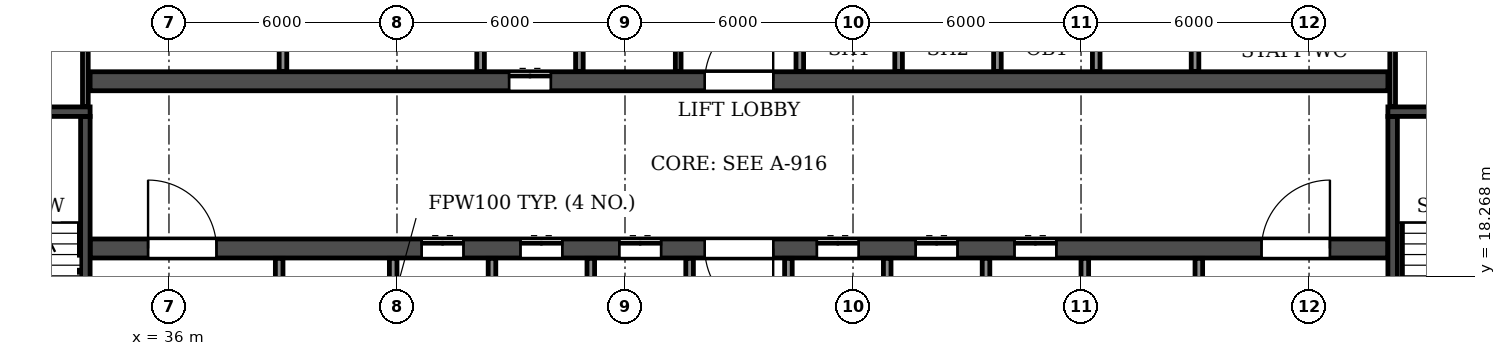
"""IFC4 building model, lengths in metres.
Left out: names, types, materials, properties, quantities, classifications, styles, units other than length and angle.
Written with IfcOpenShell. Run it as: python <this file> out.ifc"""

import sys

from ifc_helpers import new_model, si_unit, direction, frame, frame_2d, origin, place, context, subcontext, project, spatial, rectangle, extrude, element, fill, save


model = new_model("IFC4")
c1 = context("Model", 3, precision=1e-05, world=origin(), true_north=direction((0.0, 1.0)))
c2 = subcontext(c1, "Body", "Model", "MODEL_VIEW")
j1 = project(units=[si_unit("LENGTHUNIT", "METRE"), si_unit("PLANEANGLEUNIT", "RADIAN")], contexts=[c1])
p1 = place(None, origin())
s1 = spatial("IfcSite", under=j1, at=p1, CompositionType="ELEMENT")
p2 = place(p1, origin())
s2 = spatial("IfcBuilding", under=s1, at=p2, CompositionType="ELEMENT")
p3 = place(p2, frame((0.0, 0.0, 82.8)))
s3 = spatial("IfcBuildingStorey", under=s2, at=p3, CompositionType="ELEMENT", Elevation=82.8)
p4 = place(p3, frame((33.925, 19.0, 0.0), z_axis=(0.0, 0.0, 1.0), x_axis=(1.0, 0.0, 0.0)))
e1 = element("IfcWall", 1, at=p4, inside=s3, PredefinedType="SOLIDWALL", context=c2, shape_type="SweptSolid", body=[
    extrude(rectangle(XDim=34.15, YDim=0.5, at=frame_2d((17.075, 0.0))), origin(), (0.0, 0.0, 1.0), 3.06),
])
p5 = place(p4, frame((16.175, 0.0, 0.0)))
e2 = element("IfcOpeningElement", 2, at=p5, cuts=e1, PredefinedType="OPENING", context=c2, shape_type="SweptSolid", body=[
    extrude(rectangle(XDim=1.8, YDim=2.1, at=frame_2d((0.9, 1.05))), frame((0.0, 0.26, 0.0), z_axis=(0.0, -1.0, 0.0), x_axis=(1.0, 0.0, 0.0)), (0.0, 0.0, 1.0), 0.52),
])
p6 = place(p4, frame((1.525, 0.0, 0.0)))
e3 = element("IfcOpeningElement", 3, at=p6, cuts=e1, PredefinedType="OPENING", context=c2, shape_type="SweptSolid", body=[
    extrude(rectangle(XDim=1.8, YDim=2.1, at=frame_2d((0.9, 1.05))), frame((0.0, 0.26, 0.0), z_axis=(0.0, -1.0, 0.0), x_axis=(1.0, 0.0, 0.0)), (0.0, 0.0, 1.0), 0.52),
])
p7 = place(p4, frame((8.725, 0.0, 0.0)))
e4 = element("IfcOpeningElement", 4, at=p7, cuts=e1, PredefinedType="OPENING", context=c2, shape_type="SweptSolid", body=[
    extrude(rectangle(XDim=1.1, YDim=2.1, at=frame_2d((0.55, 1.05))), frame((0.0, 0.26, 0.0), z_axis=(0.0, -1.0, 0.0), x_axis=(1.0, 0.0, 0.0)), (0.0, 0.0, 1.0), 0.52),
])
p8 = place(p4, frame((11.325, 0.0, 0.0)))
e5 = element("IfcOpeningElement", 5, at=p8, cuts=e1, PredefinedType="OPENING", context=c2, shape_type="SweptSolid", body=[
    extrude(rectangle(XDim=1.1, YDim=2.1, at=frame_2d((0.55, 1.05))), frame((0.0, 0.26, 0.0), z_axis=(0.0, -1.0, 0.0), x_axis=(1.0, 0.0, 0.0)), (0.0, 0.0, 1.0), 0.52),
])
p9 = place(p4, frame((13.925, 0.0, 0.0)))
e6 = element("IfcOpeningElement", 6, at=p9, cuts=e1, PredefinedType="OPENING", context=c2, shape_type="SweptSolid", body=[
    extrude(rectangle(XDim=1.1, YDim=2.1, at=frame_2d((0.55, 1.05))), frame((0.0, 0.26, 0.0), z_axis=(0.0, -1.0, 0.0), x_axis=(1.0, 0.0, 0.0)), (0.0, 0.0, 1.0), 0.52),
])
p10 = place(p4, frame((19.125, 0.0, 0.0)))
e7 = element("IfcOpeningElement", 7, at=p10, cuts=e1, PredefinedType="OPENING", context=c2, shape_type="SweptSolid", body=[
    extrude(rectangle(XDim=1.1, YDim=2.1, at=frame_2d((0.55, 1.05))), frame((0.0, 0.26, 0.0), z_axis=(0.0, -1.0, 0.0), x_axis=(1.0, 0.0, 0.0)), (0.0, 0.0, 1.0), 0.52),
])
p11 = place(p4, frame((21.725, 0.0, 0.0)))
e8 = element("IfcOpeningElement", 8, at=p11, cuts=e1, PredefinedType="OPENING", context=c2, shape_type="SweptSolid", body=[
    extrude(rectangle(XDim=1.1, YDim=2.1, at=frame_2d((0.55, 1.05))), frame((0.0, 0.26, 0.0), z_axis=(0.0, -1.0, 0.0), x_axis=(1.0, 0.0, 0.0)), (0.0, 0.0, 1.0), 0.52),
])
p12 = place(p4, frame((24.325, 0.0, 0.0)))
e9 = element("IfcOpeningElement", 9, at=p12, cuts=e1, PredefinedType="OPENING", context=c2, shape_type="SweptSolid", body=[
    extrude(rectangle(XDim=1.1, YDim=2.1, at=frame_2d((0.55, 1.05))), frame((0.0, 0.26, 0.0), z_axis=(0.0, -1.0, 0.0), x_axis=(1.0, 0.0, 0.0)), (0.0, 0.0, 1.0), 0.52),
])
p13 = place(p4, frame((30.825, 0.0, 0.0)))
e10 = element("IfcOpeningElement", 10, at=p13, cuts=e1, PredefinedType="OPENING", context=c2, shape_type="SweptSolid", body=[
    extrude(rectangle(XDim=1.8, YDim=2.1, at=frame_2d((0.9, 1.05))), frame((0.0, 0.26, 0.0), z_axis=(0.0, -1.0, 0.0), x_axis=(1.0, 0.0, 0.0)), (0.0, 0.0, 1.0), 0.52),
])
p14 = place(p3, frame((33.925, 23.4, 0.0), z_axis=(0.0, 0.0, 1.0), x_axis=(1.0, 0.0, 0.0)))
e11 = element("IfcWall", 11, at=p14, inside=s3, PredefinedType="SOLIDWALL", context=c2, shape_type="SweptSolid", body=[
    extrude(rectangle(XDim=34.15, YDim=0.5, at=frame_2d((17.075, 0.0))), origin(), (0.0, 0.0, 1.0), 3.06),
])
p15 = place(p14, frame((16.175, 0.0, 0.0)))
e12 = element("IfcOpeningElement", 12, at=p15, cuts=e11, PredefinedType="OPENING", context=c2, shape_type="SweptSolid", body=[
    extrude(rectangle(XDim=1.8, YDim=2.1, at=frame_2d((0.9, 1.05))), frame((0.0, 0.26, 0.0), z_axis=(0.0, -1.0, 0.0), x_axis=(1.0, 0.0, 0.0)), (0.0, 0.0, 1.0), 0.52),
])
p16 = place(p14, frame((11.025, 0.0, 0.0)))
e13 = element("IfcOpeningElement", 13, at=p16, cuts=e11, PredefinedType="OPENING", context=c2, shape_type="SweptSolid", body=[
    extrude(rectangle(XDim=1.1, YDim=2.1, at=frame_2d((0.55, 1.05))), frame((0.0, 0.26, 0.0), z_axis=(0.0, -1.0, 0.0), x_axis=(1.0, 0.0, 0.0)), (0.0, 0.0, 1.0), 0.52),
])
p17 = place(p3, frame((33.8, 14.85, 0.0), z_axis=(0.0, 0.0, 1.0), x_axis=(0.0, 1.0, 0.0)))
e14 = element("IfcWall", 14, at=p17, inside=s3, PredefinedType="SOLIDWALL", context=c2, shape_type="SweptSolid", body=[
    extrude(rectangle(XDim=7.625, YDim=0.25, at=frame_2d((3.812, 0.0))), origin(), (0.0, 0.0, 1.0), 3.06),
])
p18 = place(p17, frame((0.45, 0.0, 0.0)))
e15 = element("IfcOpeningElement", 15, at=p18, cuts=e14, PredefinedType="OPENING", context=c2, shape_type="SweptSolid", body=[
    extrude(rectangle(XDim=1.0, YDim=2.1, at=frame_2d((0.5, 1.05))), frame((0.0, 0.135, 0.0), z_axis=(0.0, -1.0, 0.0), x_axis=(1.0, 0.0, 0.0)), (0.0, 0.0, 1.0), 0.27),
])
p19 = place(p3, frame((29.875, 22.6, 0.0), z_axis=(0.0, 0.0, 1.0), x_axis=(1.0, 0.0, 0.0)))
e16 = element("IfcWall", 16, at=p19, inside=s3, PredefinedType="SOLIDWALL", context=c2, shape_type="SweptSolid", body=[
    extrude(rectangle(XDim=4.05, YDim=0.25, at=frame_2d((2.025, 0.0))), origin(), (0.0, 0.0, 1.0), 3.06),
])
p20 = place(p3, frame((68.2, 14.85, 0.0), z_axis=(0.0, 0.0, 1.0), x_axis=(0.0, 1.0, 0.0)))
e17 = element("IfcWall", 17, at=p20, inside=s3, PredefinedType="SOLIDWALL", context=c2, shape_type="SweptSolid", body=[
    extrude(rectangle(XDim=7.625, YDim=0.25, at=frame_2d((3.812, 0.0))), origin(), (0.0, 0.0, 1.0), 3.06),
])
p21 = place(p20, frame((0.45, 0.0, 0.0)))
e18 = element("IfcOpeningElement", 18, at=p21, cuts=e17, PredefinedType="OPENING", context=c2, shape_type="SweptSolid", body=[
    extrude(rectangle(XDim=1.0, YDim=2.1, at=frame_2d((0.5, 1.05))), frame((0.0, 0.135, 0.0), z_axis=(0.0, -1.0, 0.0), x_axis=(1.0, 0.0, 0.0)), (0.0, 0.0, 1.0), 0.27),
])
p22 = place(p3, frame((68.075, 22.6, 0.0), z_axis=(0.0, 0.0, 1.0), x_axis=(1.0, 0.0, 0.0)))
e19 = element("IfcWall", 19, at=p22, inside=s3, PredefinedType="SOLIDWALL", context=c2, shape_type="SweptSolid", body=[
    extrude(rectangle(XDim=4.05, YDim=0.25, at=frame_2d((2.025, 0.0))), origin(), (0.0, 0.0, 1.0), 3.06),
])
p23 = place(p3, frame((49.4, 23.66, 0.0), z_axis=(0.0, 0.0, 1.0), x_axis=(0.0, 1.0, 0.0)))
e20 = element("IfcWall", 20, at=p23, inside=s3, PredefinedType="PARTITIONING", context=c2, shape_type="SweptSolid", body=[
    extrude(rectangle(XDim=3.88, YDim=0.15, at=frame_2d((1.94, 0.0))), origin(), (0.0, 0.0, 1.0), 3.06),
])
for number, where, z_axis, x_axis in (
    (21, (39.0, 23.66, 0.0), (0.0, 0.0, 1.0), (0.0, 1.0, 0.0)),
    (22, (63.0, 23.66, 0.0), (0.0, 0.0, 1.0), (0.0, 1.0, 0.0)),
):
    element("IfcWall", number, at=place(p3, frame(where, z_axis=z_axis, x_axis=x_axis)), inside=s3, PredefinedType="PARTITIONING", context=c2, shape_type="SweptSolid", body=[
        extrude(rectangle(XDim=3.88, YDim=0.2, at=frame_2d((1.94, 0.0))), origin(), (0.0, 0.0, 1.0), 3.06),
    ])
for number, where, z_axis, x_axis in (
    (23, (33.8, 22.735, 0.0), (0.0, 0.0, 1.0), (0.0, 1.0, 0.0)),
    (24, (68.2, 22.735, 0.0), (0.0, 0.0, 1.0), (0.0, 1.0, 0.0)),
):
    element("IfcWall", number, at=place(p3, frame(where, z_axis=z_axis, x_axis=x_axis)), inside=s3, PredefinedType="PARTITIONING", context=c2, shape_type="SweptSolid", body=[
        extrude(rectangle(XDim=4.805, YDim=0.15, at=frame_2d((2.402, 0.0))), origin(), (0.0, 0.0, 1.0), 3.06),
    ])
p24 = place(p3, frame((38.9, 14.86, 0.0), z_axis=(0.0, 0.0, 1.0), x_axis=(0.0, 1.0, 0.0)))
e25 = element("IfcWall", 25, at=p24, inside=s3, PredefinedType="PARTITIONING", context=c2, shape_type="SweptSolid", body=[
    extrude(rectangle(XDim=3.88, YDim=0.2, at=frame_2d((1.94, 0.0))), origin(), (0.0, 0.0, 1.0), 3.06),
])
p25 = place(p24, frame((1.39, 0.0, 0.0)))
e26 = element("IfcOpeningElement", 26, at=p25, cuts=e25, PredefinedType="OPENING", context=c2, shape_type="SweptSolid", body=[
    extrude(rectangle(XDim=1.1, YDim=2.1, at=frame_2d((0.55, 1.05))), frame((0.0, 0.11, 0.0), z_axis=(0.0, -1.0, 0.0), x_axis=(1.0, 0.0, 0.0)), (0.0, 0.0, 1.0), 0.22),
])
p26 = place(p3, frame((41.9, 14.86, 0.0), z_axis=(0.0, 0.0, 1.0), x_axis=(0.0, 1.0, 0.0)))
e27 = element("IfcWall", 27, at=p26, inside=s3, PredefinedType="PARTITIONING", context=c2, shape_type="SweptSolid", body=[
    extrude(rectangle(XDim=3.88, YDim=0.2, at=frame_2d((1.94, 0.0))), origin(), (0.0, 0.0, 1.0), 3.06),
])
p27 = place(p3, frame((44.2, 23.66, 0.0), z_axis=(0.0, 0.0, 1.0), x_axis=(0.0, 1.0, 0.0)))
e28 = element("IfcWall", 28, at=p27, inside=s3, PredefinedType="PARTITIONING", context=c2, shape_type="SweptSolid", body=[
    extrude(rectangle(XDim=3.88, YDim=0.2, at=frame_2d((1.94, 0.0))), origin(), (0.0, 0.0, 1.0), 3.06),
])
p28 = place(p3, frame((44.5, 16.3, 0.0), z_axis=(0.0, 0.0, 1.0), x_axis=(0.0, 1.0, 0.0)))
e29 = element("IfcWall", 29, at=p28, inside=s3, PredefinedType="PARTITIONING", context=c2, shape_type="SweptSolid", body=[
    extrude(rectangle(XDim=2.44, YDim=0.2, at=frame_2d((1.22, 0.0))), origin(), (0.0, 0.0, 1.0), 3.06),
])
p29 = place(p3, frame((46.8, 23.66, 0.0), z_axis=(0.0, 0.0, 1.0), x_axis=(0.0, 1.0, 0.0)))
e30 = element("IfcWall", 30, at=p29, inside=s3, PredefinedType="PARTITIONING", context=c2, shape_type="SweptSolid", body=[
    extrude(rectangle(XDim=3.88, YDim=0.2, at=frame_2d((1.94, 0.0))), origin(), (0.0, 0.0, 1.0), 3.06),
])
for number, where, z_axis, x_axis in (
    (31, (47.1, 16.3, 0.0), (0.0, 0.0, 1.0), (0.0, 1.0, 0.0)),
    (32, (49.7, 16.3, 0.0), (0.0, 0.0, 1.0), (0.0, 1.0, 0.0)),
    (33, (52.3, 16.3, 0.0), (0.0, 0.0, 1.0), (0.0, 1.0, 0.0)),
):
    element("IfcWall", number, at=place(p3, frame(where, z_axis=z_axis, x_axis=x_axis)), inside=s3, PredefinedType="PARTITIONING", context=c2, shape_type="SweptSolid", body=[
        extrude(rectangle(XDim=2.44, YDim=0.2, at=frame_2d((1.22, 0.0))), origin(), (0.0, 0.0, 1.0), 3.06),
    ])
p30 = place(p3, frame((52.6, 23.66, 0.0), z_axis=(0.0, 0.0, 1.0), x_axis=(0.0, 1.0, 0.0)))
e34 = element("IfcWall", 34, at=p30, inside=s3, PredefinedType="PARTITIONING", context=c2, shape_type="SweptSolid", body=[
    extrude(rectangle(XDim=2.44, YDim=0.2, at=frame_2d((1.22, 0.0))), origin(), (0.0, 0.0, 1.0), 3.06),
])
p31 = place(p3, frame((54.9, 16.3, 0.0), z_axis=(0.0, 0.0, 1.0), x_axis=(0.0, 1.0, 0.0)))
e35 = element("IfcWall", 35, at=p31, inside=s3, PredefinedType="PARTITIONING", context=c2, shape_type="SweptSolid", body=[
    extrude(rectangle(XDim=2.44, YDim=0.2, at=frame_2d((1.22, 0.0))), origin(), (0.0, 0.0, 1.0), 3.06),
])
p32 = place(p3, frame((55.2, 23.66, 0.0), z_axis=(0.0, 0.0, 1.0), x_axis=(0.0, 1.0, 0.0)))
e36 = element("IfcWall", 36, at=p32, inside=s3, PredefinedType="PARTITIONING", context=c2, shape_type="SweptSolid", body=[
    extrude(rectangle(XDim=2.44, YDim=0.2, at=frame_2d((1.22, 0.0))), origin(), (0.0, 0.0, 1.0), 3.06),
])
p33 = place(p3, frame((57.5, 16.3, 0.0), z_axis=(0.0, 0.0, 1.0), x_axis=(0.0, 1.0, 0.0)))
e37 = element("IfcWall", 37, at=p33, inside=s3, PredefinedType="PARTITIONING", context=c2, shape_type="SweptSolid", body=[
    extrude(rectangle(XDim=2.44, YDim=0.2, at=frame_2d((1.22, 0.0))), origin(), (0.0, 0.0, 1.0), 3.06),
])
p34 = place(p3, frame((57.8, 23.66, 0.0), z_axis=(0.0, 0.0, 1.0), x_axis=(0.0, 1.0, 0.0)))
e38 = element("IfcWall", 38, at=p34, inside=s3, PredefinedType="PARTITIONING", context=c2, shape_type="SweptSolid", body=[
    extrude(rectangle(XDim=2.44, YDim=0.2, at=frame_2d((1.22, 0.0))), origin(), (0.0, 0.0, 1.0), 3.06),
])
p35 = place(p3, frame((60.1, 14.86, 0.0), z_axis=(0.0, 0.0, 1.0), x_axis=(0.0, 1.0, 0.0)))
e39 = element("IfcWall", 39, at=p35, inside=s3, PredefinedType="PARTITIONING", context=c2, shape_type="SweptSolid", body=[
    extrude(rectangle(XDim=3.88, YDim=0.2, at=frame_2d((1.94, 0.0))), origin(), (0.0, 0.0, 1.0), 3.06),
])
p36 = place(p3, frame((60.4, 23.66, 0.0), z_axis=(0.0, 0.0, 1.0), x_axis=(0.0, 1.0, 0.0)))
e40 = element("IfcWall", 40, at=p36, inside=s3, PredefinedType="PARTITIONING", context=c2, shape_type="SweptSolid", body=[
    extrude(rectangle(XDim=2.44, YDim=0.2, at=frame_2d((1.22, 0.0))), origin(), (0.0, 0.0, 1.0), 3.06),
])
p37 = place(p3, frame((63.1, 14.86, 0.0), z_axis=(0.0, 0.0, 1.0), x_axis=(0.0, 1.0, 0.0)))
e41 = element("IfcWall", 41, at=p37, inside=s3, PredefinedType="PARTITIONING", context=c2, shape_type="SweptSolid", body=[
    extrude(rectangle(XDim=3.88, YDim=0.2, at=frame_2d((1.94, 0.0))), origin(), (0.0, 0.0, 1.0), 3.06),
])
p38 = place(p37, frame((1.39, 0.0, 0.0)))
e42 = element("IfcOpeningElement", 42, at=p38, cuts=e41, PredefinedType="OPENING", context=c2, shape_type="SweptSolid", body=[
    extrude(rectangle(XDim=1.1, YDim=2.1, at=frame_2d((0.55, 1.05))), frame((0.0, 0.11, 0.0), z_axis=(0.0, -1.0, 0.0), x_axis=(1.0, 0.0, 0.0)), (0.0, 0.0, 1.0), 0.22),
])
p39 = place(p15, origin())
e43 = element("IfcDoor", 43, at=p39, inside=s3, OperationType="DOUBLE_DOOR_SINGLE_SWING", PredefinedType="DOOR", context=c2, shape_type="SweptSolid", body=[
    extrude(rectangle(XDim=1.8, YDim=2.1, at=frame_2d((0.9, 1.05))), frame((0.0, 0.025, 0.0), z_axis=(0.0, -1.0, 0.0), x_axis=(1.0, 0.0, 0.0)), (0.0, 0.0, 1.0), 0.05),
])
fill(e12, e43)
p40 = place(p5, frame((1.8, 0.0, 0.0), z_axis=(0.0, 0.0, 1.0), x_axis=(-1.0, 0.0, 0.0)))
e44 = element("IfcDoor", 44, at=p40, inside=s3, OperationType="DOUBLE_DOOR_SINGLE_SWING", PredefinedType="DOOR", context=c2, shape_type="SweptSolid", body=[
    extrude(rectangle(XDim=1.8, YDim=2.1, at=frame_2d((0.9, 1.05))), frame((0.0, 0.025, 0.0), z_axis=(0.0, -1.0, 0.0), x_axis=(1.0, 0.0, 0.0)), (0.0, 0.0, 1.0), 0.05),
])
fill(e2, e44)
p41 = place(p6, origin())
e45 = element("IfcDoor", 45, at=p41, inside=s3, OperationType="DOUBLE_DOOR_SINGLE_SWING", PredefinedType="DOOR", context=c2, shape_type="SweptSolid", body=[
    extrude(rectangle(XDim=1.8, YDim=2.1, at=frame_2d((0.9, 1.05))), frame((0.0, 0.025, 0.0), z_axis=(0.0, -1.0, 0.0), x_axis=(1.0, 0.0, 0.0)), (0.0, 0.0, 1.0), 0.05),
])
fill(e3, e45)
p42 = place(p7, origin())
e46 = element("IfcDoor", 46, at=p42, inside=s3, OperationType="DOUBLE_DOOR_SLIDING", PredefinedType="DOOR", context=c2, shape_type="SweptSolid", body=[
    extrude(rectangle(XDim=1.1, YDim=2.1, at=frame_2d((0.55, 1.05))), frame((0.0, 0.025, 0.0), z_axis=(0.0, -1.0, 0.0), x_axis=(1.0, 0.0, 0.0)), (0.0, 0.0, 1.0), 0.05),
])
fill(e4, e46)
p43 = place(p16, origin())
e47 = element("IfcDoor", 47, at=p43, inside=s3, OperationType="DOUBLE_DOOR_SLIDING", PredefinedType="DOOR", context=c2, shape_type="SweptSolid", body=[
    extrude(rectangle(XDim=1.1, YDim=2.1, at=frame_2d((0.55, 1.05))), frame((0.0, 0.025, 0.0), z_axis=(0.0, -1.0, 0.0), x_axis=(1.0, 0.0, 0.0)), (0.0, 0.0, 1.0), 0.05),
])
fill(e13, e47)
p44 = place(p8, origin())
e48 = element("IfcDoor", 48, at=p44, inside=s3, OperationType="DOUBLE_DOOR_SLIDING", PredefinedType="DOOR", context=c2, shape_type="SweptSolid", body=[
    extrude(rectangle(XDim=1.1, YDim=2.1, at=frame_2d((0.55, 1.05))), frame((0.0, 0.025, 0.0), z_axis=(0.0, -1.0, 0.0), x_axis=(1.0, 0.0, 0.0)), (0.0, 0.0, 1.0), 0.05),
])
fill(e5, e48)
p45 = place(p9, origin())
e49 = element("IfcDoor", 49, at=p45, inside=s3, OperationType="DOUBLE_DOOR_SLIDING", PredefinedType="DOOR", context=c2, shape_type="SweptSolid", body=[
    extrude(rectangle(XDim=1.1, YDim=2.1, at=frame_2d((0.55, 1.05))), frame((0.0, 0.025, 0.0), z_axis=(0.0, -1.0, 0.0), x_axis=(1.0, 0.0, 0.0)), (0.0, 0.0, 1.0), 0.05),
])
fill(e6, e49)
p46 = place(p10, origin())
e50 = element("IfcDoor", 50, at=p46, inside=s3, OperationType="DOUBLE_DOOR_SLIDING", PredefinedType="DOOR", context=c2, shape_type="SweptSolid", body=[
    extrude(rectangle(XDim=1.1, YDim=2.1, at=frame_2d((0.55, 1.05))), frame((0.0, 0.025, 0.0), z_axis=(0.0, -1.0, 0.0), x_axis=(1.0, 0.0, 0.0)), (0.0, 0.0, 1.0), 0.05),
])
fill(e7, e50)
p47 = place(p11, origin())
e51 = element("IfcDoor", 51, at=p47, inside=s3, OperationType="DOUBLE_DOOR_SLIDING", PredefinedType="DOOR", context=c2, shape_type="SweptSolid", body=[
    extrude(rectangle(XDim=1.1, YDim=2.1, at=frame_2d((0.55, 1.05))), frame((0.0, 0.025, 0.0), z_axis=(0.0, -1.0, 0.0), x_axis=(1.0, 0.0, 0.0)), (0.0, 0.0, 1.0), 0.05),
])
fill(e8, e51)
p48 = place(p12, origin())
e52 = element("IfcDoor", 52, at=p48, inside=s3, OperationType="DOUBLE_DOOR_SLIDING", PredefinedType="DOOR", context=c2, shape_type="SweptSolid", body=[
    extrude(rectangle(XDim=1.1, YDim=2.1, at=frame_2d((0.55, 1.05))), frame((0.0, 0.025, 0.0), z_axis=(0.0, -1.0, 0.0), x_axis=(1.0, 0.0, 0.0)), (0.0, 0.0, 1.0), 0.05),
])
fill(e9, e52)
p49 = place(p13, origin())
e53 = element("IfcDoor", 53, at=p49, inside=s3, OperationType="DOUBLE_DOOR_SINGLE_SWING", PredefinedType="DOOR", context=c2, shape_type="SweptSolid", body=[
    extrude(rectangle(XDim=1.8, YDim=2.1, at=frame_2d((0.9, 1.05))), frame((0.0, 0.025, 0.0), z_axis=(0.0, -1.0, 0.0), x_axis=(1.0, 0.0, 0.0)), (0.0, 0.0, 1.0), 0.05),
])
fill(e10, e53)
save(model, sys.argv[1])
